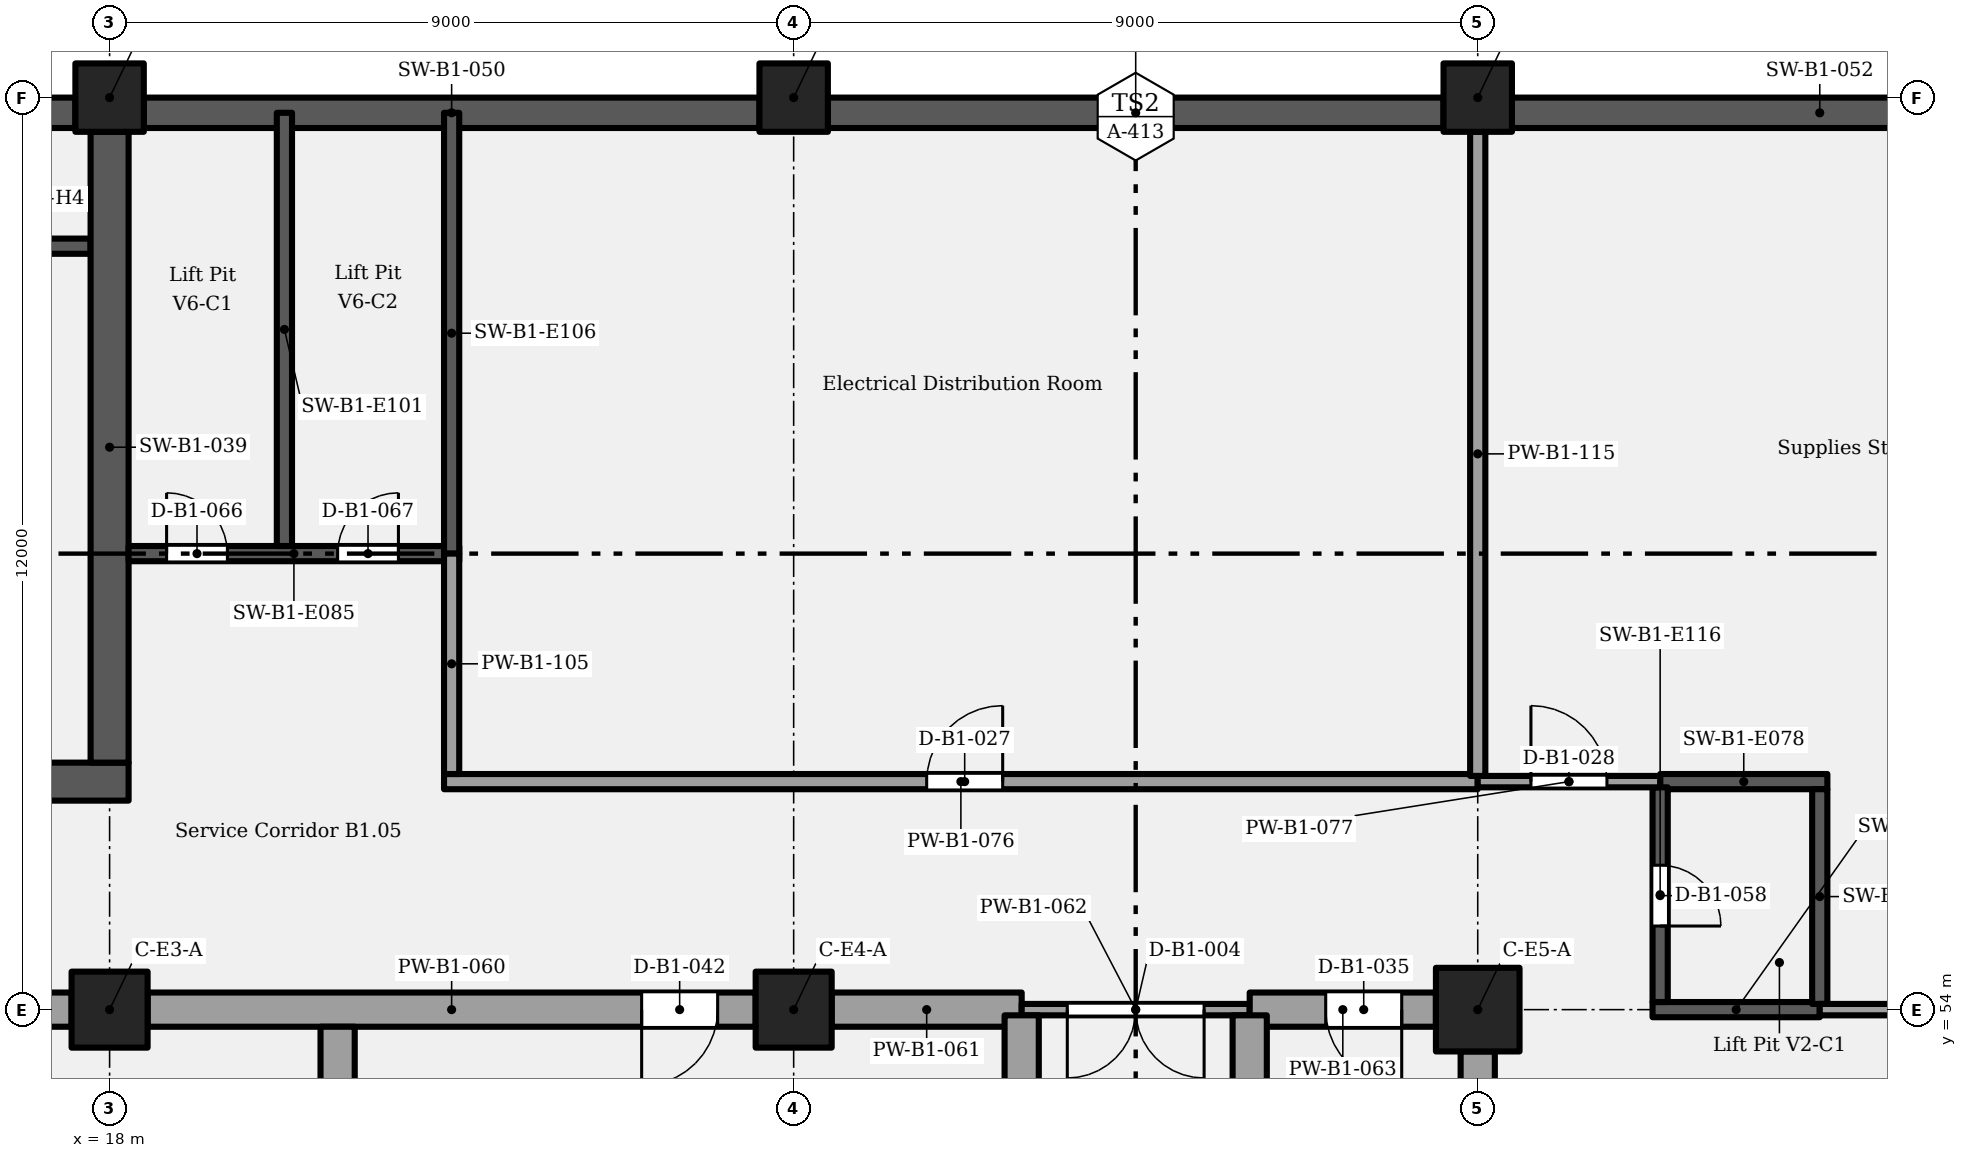
"""IFC4 building model, lengths in metres.
Left out: names, types, materials, properties, quantities, classifications, styles, units other than length and angle.
Written with IfcOpenShell. Run it as: python <this file> out.ifc"""

import sys

from ifc_helpers import new_model, si_unit, direction, frame, frame_2d, origin, origin_2d, place, context, subcontext, project, spatial, rectangle, extrude, element, fill, save


model = new_model("IFC4")
c1 = context("Model", 3, precision=1e-05, world=origin(), true_north=direction((0.0, 1.0)))
c2 = subcontext(c1, "Body", "Model", "MODEL_VIEW")
j1 = project(units=[si_unit("LENGTHUNIT", "METRE"), si_unit("PLANEANGLEUNIT", "RADIAN")], contexts=[c1])
p1 = place(None, origin())
s1 = spatial("IfcSite", under=j1, at=p1, CompositionType="ELEMENT")
p2 = place(p1, origin())
s2 = spatial("IfcBuilding", under=s1, at=p2, CompositionType="ELEMENT")
p3 = place(p2, frame((0.0, 0.0, -4.2)))
s3 = spatial("IfcBuildingStorey", under=s2, at=p3, CompositionType="ELEMENT", Elevation=-4.2)
for number, where, z_axis, x_axis in (
    (1, (18.0, 54.0, 0.0), (0.0, 0.0, 1.0), (1.0, 0.0, 0.0)),
    (2, (27.0, 54.0, 0.0), (0.0, 0.0, 1.0), (1.0, 0.0, 0.0)),
):
    element("IfcColumn", number, at=place(p3, frame(where, z_axis=z_axis, x_axis=x_axis)), inside=s3, PredefinedType="COLUMN", context=c2, shape_type="SweptSolid", body=[
        extrude(rectangle(XDim=1.0, YDim=1.0, at=origin_2d()), origin(), (0.0, 0.0, 1.0), 4.2),
    ])
p4 = place(p3, frame((36.0, 54.0, 0.0), z_axis=(0.0, 0.0, 1.0), x_axis=(1.0, 0.0, 0.0)))
e3 = element("IfcColumn", 3, at=p4, inside=s3, PredefinedType="COLUMN", context=c2, shape_type="SweptSolid", body=[
    extrude(rectangle(XDim=1.1, YDim=1.1, at=origin_2d()), origin(), (0.0, 0.0, 1.0), 4.2),
])
for number, where, z_axis, x_axis in (
    (4, (18.0, 66.0, 0.0), (0.0, 0.0, 1.0), (1.0, 0.0, 0.0)),
    (5, (27.0, 66.0, 0.0), (0.0, 0.0, 1.0), (1.0, 0.0, 0.0)),
    (6, (36.0, 66.0, 0.0), (0.0, 0.0, 1.0), (1.0, 0.0, 0.0)),
):
    element("IfcColumn", number, at=place(p3, frame(where, z_axis=z_axis, x_axis=x_axis)), inside=s3, PredefinedType="COLUMN", context=c2, shape_type="SweptSolid", body=[
        extrude(rectangle(XDim=0.9, YDim=0.9, at=origin_2d()), origin(), (0.0, 0.0, 1.0), 4.2),
    ])
p5 = place(p3, frame((8.75, 57.0, 0.0), z_axis=(0.0, 0.0, 1.0), x_axis=(1.0, 0.0, 0.0)))
e7 = element("IfcWall", 7, at=p5, inside=s3, PredefinedType="SHEAR", context=c2, shape_type="SweptSolid", body=[
    extrude(rectangle(XDim=9.5, YDim=0.5, at=frame_2d((4.75, 0.0))), origin(), (0.0, 0.0, 1.0), 3.9),
])
p6 = place(p5, frame((4.15, 0.0, 0.0)))
e8 = element("IfcOpeningElement", 8, at=p6, cuts=e7, PredefinedType="OPENING", context=c2, shape_type="SweptSolid", body=[
    extrude(rectangle(XDim=1.2, YDim=2.1, at=frame_2d((0.6, 1.05))), frame((0.0, 0.26, 0.0), z_axis=(0.0, -1.0, 0.0), x_axis=(1.0, 0.0, 0.0)), (0.0, 0.0, 1.0), 0.52),
])
p7 = place(p3, frame((18.0, 57.25, 0.0), z_axis=(0.0, 0.0, 1.0), x_axis=(0.0, 1.0, 0.0)))
e9 = element("IfcWall", 9, at=p7, inside=s3, PredefinedType="SHEAR", context=c2, shape_type="SweptSolid", body=[
    extrude(rectangle(XDim=8.3, YDim=0.5, at=frame_2d((4.15, 0.0))), origin(), (0.0, 0.0, 1.0), 3.9),
])
for number, where, z_axis, x_axis in (
    (10, (9.45, 65.8, 0.0), (0.0, 0.0, 1.0), (1.0, 0.0, 0.0)),
    (11, (18.45, 65.8, 0.0), (0.0, 0.0, 1.0), (1.0, 0.0, 0.0)),
    (12, (27.45, 65.8, 0.0), (0.0, 0.0, 1.0), (1.0, 0.0, 0.0)),
    (13, (36.45, 65.8, 0.0), (0.0, 0.0, 1.0), (1.0, 0.0, 0.0)),
):
    element("IfcWall", number, at=place(p3, frame(where, z_axis=z_axis, x_axis=x_axis)), inside=s3, PredefinedType="SOLIDWALL", context=c2, shape_type="SweptSolid", body=[
        extrude(rectangle(XDim=8.1, YDim=0.4, at=frame_2d((4.05, 0.0))), origin(), (0.0, 0.0, 1.0), 3.9),
    ])
p8 = place(p3, frame((9.5, 54.0, 0.0), z_axis=(0.0, 0.0, 1.0), x_axis=(1.0, 0.0, 0.0)))
e14 = element("IfcWall", 14, at=p8, inside=s3, PredefinedType="PARTITIONING", context=c2, shape_type="SweptSolid", body=[
    extrude(rectangle(XDim=8.0, YDim=0.45, at=frame_2d((4.0, 0.0))), origin(), (0.0, 0.0, 1.0), 3.15),
])
p9 = place(p8, frame((7.5, 0.0, 0.0), z_axis=(0.0, 0.0, 1.0), x_axis=(-1.0, 0.0, 0.0)))
e15 = element("IfcOpeningElement", 15, at=p9, cuts=e14, PredefinedType="OPENING", context=c2, shape_type="SweptSolid", body=[
    extrude(rectangle(XDim=1.0, YDim=2.1, at=frame_2d((0.5, 1.05))), frame((0.0, 0.235, 0.0), z_axis=(0.0, -1.0, 0.0), x_axis=(1.0, 0.0, 0.0)), (0.0, 0.0, 1.0), 0.47),
])
p10 = place(p3, frame((18.5, 54.0, 0.0), z_axis=(0.0, 0.0, 1.0), x_axis=(1.0, 0.0, 0.0)))
e16 = element("IfcWall", 16, at=p10, inside=s3, PredefinedType="PARTITIONING", context=c2, shape_type="SweptSolid", body=[
    extrude(rectangle(XDim=8.0, YDim=0.45, at=frame_2d((4.0, 0.0))), origin(), (0.0, 0.0, 1.0), 3.15),
])
p11 = place(p10, frame((7.5, 0.0, 0.0), z_axis=(0.0, 0.0, 1.0), x_axis=(-1.0, 0.0, 0.0)))
e17 = element("IfcOpeningElement", 17, at=p11, cuts=e16, PredefinedType="OPENING", context=c2, shape_type="SweptSolid", body=[
    extrude(rectangle(XDim=1.0, YDim=2.1, at=frame_2d((0.5, 1.05))), frame((0.0, 0.235, 0.0), z_axis=(0.0, -1.0, 0.0), x_axis=(1.0, 0.0, 0.0)), (0.0, 0.0, 1.0), 0.47),
])
p12 = place(p3, frame((27.5, 54.0, 0.0), z_axis=(0.0, 0.0, 1.0), x_axis=(1.0, 0.0, 0.0)))
e18 = element("IfcWall", 18, at=p12, inside=s3, PredefinedType="PARTITIONING", context=c2, shape_type="SweptSolid", body=[
    extrude(rectangle(XDim=2.5, YDim=0.45, at=frame_2d((1.25, 0.0))), origin(), (0.0, 0.0, 1.0), 3.15),
])
p13 = place(p3, frame((30.0, 54.0, 0.0), z_axis=(0.0, 0.0, 1.0), x_axis=(1.0, 0.0, 0.0)))
e19 = element("IfcWall", 19, at=p13, inside=s3, PredefinedType="PARTITIONING", context=c2, shape_type="SweptSolid", body=[
    extrude(rectangle(XDim=3.0, YDim=0.15, at=frame_2d((1.5, 0.0))), origin(), (0.0, 0.0, 1.0), 3.15),
])
p14 = place(p13, frame((2.4, 0.0, 0.0), z_axis=(0.0, 0.0, 1.0), x_axis=(-1.0, 0.0, 0.0)))
e20 = element("IfcOpeningElement", 20, at=p14, cuts=e19, PredefinedType="OPENING", context=c2, shape_type="SweptSolid", body=[
    extrude(rectangle(XDim=1.8, YDim=2.1, at=frame_2d((0.9, 1.05))), frame((0.0, 0.085, 0.0), z_axis=(0.0, -1.0, 0.0), x_axis=(1.0, 0.0, 0.0)), (0.0, 0.0, 1.0), 0.17),
])
p15 = place(p3, frame((33.0, 54.0, 0.0), z_axis=(0.0, 0.0, 1.0), x_axis=(1.0, 0.0, 0.0)))
e21 = element("IfcWall", 21, at=p15, inside=s3, PredefinedType="PARTITIONING", context=c2, shape_type="SweptSolid", body=[
    extrude(rectangle(XDim=2.45, YDim=0.45, at=frame_2d((1.225, 0.0))), origin(), (0.0, 0.0, 1.0), 3.15),
])
p16 = place(p15, frame((2.0, 0.0, 0.0), z_axis=(0.0, 0.0, 1.0), x_axis=(-1.0, 0.0, 0.0)))
e22 = element("IfcOpeningElement", 22, at=p16, cuts=e21, PredefinedType="OPENING", context=c2, shape_type="SweptSolid", body=[
    extrude(rectangle(XDim=1.0, YDim=2.1, at=frame_2d((0.5, 1.05))), frame((0.0, 0.235, 0.0), z_axis=(0.0, -1.0, 0.0), x_axis=(1.0, 0.0, 0.0)), (0.0, 0.0, 1.0), 0.47),
])
p17 = place(p3, frame((38.3, 54.0, 0.0), z_axis=(0.0, 0.0, 1.0), x_axis=(1.0, 0.0, 0.0)))
e23 = element("IfcWall", 23, at=p17, inside=s3, PredefinedType="SHEAR", context=c2, shape_type="SweptSolid", body=[
    extrude(rectangle(XDim=2.2, YDim=0.2, at=frame_2d((1.1, 0.0))), origin(), (0.0, 0.0, 1.0), 3.9),
])
p18 = place(p3, frame((40.5, 54.0, 0.0), z_axis=(0.0, 0.0, 1.0), x_axis=(1.0, 0.0, 0.0)))
e24 = element("IfcWall", 24, at=p18, inside=s3, PredefinedType="PARTITIONING", context=c2, shape_type="SweptSolid", body=[
    extrude(rectangle(XDim=3.95, YDim=0.15, at=frame_2d((1.975, 0.0))), origin(), (0.0, 0.0, 1.0), 3.15),
])
p19 = place(p3, frame((22.4, 57.0, 0.0), z_axis=(0.0, 0.0, 1.0), x_axis=(1.0, 0.0, 0.0)))
e25 = element("IfcWall", 25, at=p19, inside=s3, PredefinedType="PARTITIONING", context=c2, shape_type="SweptSolid", body=[
    extrude(rectangle(XDim=13.6, YDim=0.2, at=frame_2d((6.8, 0.0))), origin(), (0.0, 0.0, 1.0), 3.9),
])
p20 = place(p19, frame((6.35, 0.0, 0.0)))
e26 = element("IfcOpeningElement", 26, at=p20, cuts=e25, PredefinedType="OPENING", context=c2, shape_type="SweptSolid", body=[
    extrude(rectangle(XDim=1.0, YDim=2.1, at=frame_2d((0.5, 1.05))), frame((0.0, 0.11, 0.0), z_axis=(0.0, -1.0, 0.0), x_axis=(1.0, 0.0, 0.0)), (0.0, 0.0, 1.0), 0.22),
])
p21 = place(p3, frame((36.0, 57.0, 0.0), z_axis=(0.0, 0.0, 1.0), x_axis=(1.0, 0.0, 0.0)))
e27 = element("IfcWall", 27, at=p21, inside=s3, PredefinedType="PARTITIONING", context=c2, shape_type="SweptSolid", body=[
    extrude(rectangle(XDim=2.4, YDim=0.15, at=frame_2d((1.2, 0.0))), origin(), (0.0, 0.0, 1.0), 3.4),
])
p22 = place(p21, frame((0.7, 0.0, 0.0)))
e28 = element("IfcOpeningElement", 28, at=p22, cuts=e27, PredefinedType="OPENING", context=c2, shape_type="SweptSolid", body=[
    extrude(rectangle(XDim=1.0, YDim=2.1, at=frame_2d((0.5, 1.05))), frame((0.0, 0.085, 0.0), z_axis=(0.0, -1.0, 0.0), x_axis=(1.0, 0.0, 0.0)), (0.0, 0.0, 1.0), 0.17),
])
p23 = place(p3, frame((38.4, 57.0, 0.0), z_axis=(0.0, 0.0, 1.0), x_axis=(1.0, 0.0, 0.0)))
e29 = element("IfcWall", 29, at=p23, inside=s3, PredefinedType="SHEAR", context=c2, shape_type="SweptSolid", body=[
    extrude(rectangle(XDim=2.2, YDim=0.2, at=frame_2d((1.1, 0.0))), origin(), (0.0, 0.0, 1.0), 3.9),
])
p24 = place(p3, frame((18.25, 60.0, 0.0), z_axis=(0.0, 0.0, 1.0), x_axis=(1.0, 0.0, 0.0)))
e30 = element("IfcWall", 30, at=p24, inside=s3, PredefinedType="SHEAR", context=c2, shape_type="SweptSolid", body=[
    extrude(rectangle(XDim=4.35, YDim=0.2, at=frame_2d((2.175, 0.0))), origin(), (0.0, 0.0, 1.0), 3.9),
])
p25 = place(p24, frame((0.5, 0.0, 0.0)))
e31 = element("IfcOpeningElement", 31, at=p25, cuts=e30, PredefinedType="OPENING", context=c2, shape_type="SweptSolid", body=[
    extrude(rectangle(XDim=0.8, YDim=2.0, at=frame_2d((0.4, 1.0))), frame((0.0, 0.11, 0.0), z_axis=(0.0, -1.0, 0.0), x_axis=(1.0, 0.0, 0.0)), (0.0, 0.0, 1.0), 0.22),
])
p26 = place(p24, frame((2.75, 0.0, 0.0)))
e32 = element("IfcOpeningElement", 32, at=p26, cuts=e30, PredefinedType="OPENING", context=c2, shape_type="SweptSolid", body=[
    extrude(rectangle(XDim=0.8, YDim=2.0, at=frame_2d((0.4, 1.0))), frame((0.0, 0.11, 0.0), z_axis=(0.0, -1.0, 0.0), x_axis=(1.0, 0.0, 0.0)), (0.0, 0.0, 1.0), 0.22),
])
p27 = place(p3, frame((20.3, 60.1, 0.0), z_axis=(0.0, 0.0, 1.0), x_axis=(0.0, 1.0, 0.0)))
e33 = element("IfcWall", 33, at=p27, inside=s3, PredefinedType="SHEAR", context=c2, shape_type="SweptSolid", body=[
    extrude(rectangle(XDim=5.7, YDim=0.2, at=frame_2d((2.85, 0.0))), origin(), (0.0, 0.0, 1.0), 3.9),
])
p28 = place(p3, frame((21.0, 37.5, 0.0), z_axis=(0.0, 0.0, 1.0), x_axis=(0.0, 1.0, 0.0)))
e34 = element("IfcWall", 34, at=p28, inside=s3, PredefinedType="PARTITIONING", context=c2, shape_type="SweptSolid", body=[
    extrude(rectangle(XDim=16.275, YDim=0.45, at=frame_2d((8.137, 0.0))), origin(), (0.0, 0.0, 1.0), 3.9),
])
p29 = place(p3, frame((22.5, 57.1, 0.0), z_axis=(0.0, 0.0, 1.0), x_axis=(0.0, 1.0, 0.0)))
e35 = element("IfcWall", 35, at=p29, inside=s3, PredefinedType="PARTITIONING", context=c2, shape_type="SweptSolid", body=[
    extrude(rectangle(XDim=2.9, YDim=0.2, at=frame_2d((1.45, 0.0))), origin(), (0.0, 0.0, 1.0), 3.15),
])
p30 = place(p3, frame((22.5, 60.0, 0.0), z_axis=(0.0, 0.0, 1.0), x_axis=(0.0, 1.0, 0.0)))
e36 = element("IfcWall", 36, at=p30, inside=s3, PredefinedType="SHEAR", context=c2, shape_type="SweptSolid", body=[
    extrude(rectangle(XDim=5.8, YDim=0.2, at=frame_2d((2.9, 0.0))), origin(), (0.0, 0.0, 1.0), 3.9),
])
p31 = place(p3, frame((30.0, 37.5, 0.0), z_axis=(0.0, 0.0, 1.0), x_axis=(0.0, 1.0, 0.0)))
e37 = element("IfcWall", 37, at=p31, inside=s3, PredefinedType="PARTITIONING", context=c2, shape_type="SweptSolid", body=[
    extrude(rectangle(XDim=16.425, YDim=0.45, at=frame_2d((8.212, 0.0))), origin(), (0.0, 0.0, 1.0), 3.9),
])
p32 = place(p31, frame((3.65, 0.0, 0.0)))
e38 = element("IfcOpeningElement", 38, at=p32, cuts=e37, PredefinedType="OPENING", context=c2, shape_type="SweptSolid", body=[
    extrude(rectangle(XDim=1.0, YDim=2.1, at=frame_2d((0.5, 1.05))), frame((0.0, 0.235, 0.0), z_axis=(0.0, -1.0, 0.0), x_axis=(1.0, 0.0, 0.0)), (0.0, 0.0, 1.0), 0.47),
])
p33 = place(p3, frame((33.0, 37.5, 0.0), z_axis=(0.0, 0.0, 1.0), x_axis=(0.0, 1.0, 0.0)))
e39 = element("IfcWall", 39, at=p33, inside=s3, PredefinedType="PARTITIONING", context=c2, shape_type="SweptSolid", body=[
    extrude(rectangle(XDim=16.425, YDim=0.45, at=frame_2d((8.212, 0.0))), origin(), (0.0, 0.0, 1.0), 3.9),
])
p34 = place(p33, frame((4.65, 0.0, 0.0), z_axis=(0.0, 0.0, 1.0), x_axis=(-1.0, 0.0, 0.0)))
e40 = element("IfcOpeningElement", 40, at=p34, cuts=e39, PredefinedType="OPENING", context=c2, shape_type="SweptSolid", body=[
    extrude(rectangle(XDim=1.0, YDim=2.1, at=frame_2d((0.5, 1.05))), frame((0.0, 0.235, 0.0), z_axis=(0.0, -1.0, 0.0), x_axis=(1.0, 0.0, 0.0)), (0.0, 0.0, 1.0), 0.47),
])
p35 = place(p3, frame((36.0, 51.225, 0.0), z_axis=(0.0, 0.0, 1.0), x_axis=(0.0, 1.0, 0.0)))
e41 = element("IfcWall", 41, at=p35, inside=s3, PredefinedType="PARTITIONING", context=c2, shape_type="SweptSolid", body=[
    extrude(rectangle(XDim=2.225, YDim=0.45, at=frame_2d((1.112, 0.0))), origin(), (0.0, 0.0, 1.0), 2.95),
])
p36 = place(p3, frame((36.0, 57.075, 0.0), z_axis=(0.0, 0.0, 1.0), x_axis=(0.0, 1.0, 0.0)))
e42 = element("IfcWall", 42, at=p36, inside=s3, PredefinedType="PARTITIONING", context=c2, shape_type="SweptSolid", body=[
    extrude(rectangle(XDim=8.475, YDim=0.2, at=frame_2d((4.238, 0.0))), origin(), (0.0, 0.0, 1.0), 3.15),
])
p37 = place(p3, frame((38.4, 54.1, 0.0), z_axis=(0.0, 0.0, 1.0), x_axis=(0.0, 1.0, 0.0)))
e43 = element("IfcWall", 43, at=p37, inside=s3, PredefinedType="SHEAR", context=c2, shape_type="SweptSolid", body=[
    extrude(rectangle(XDim=2.825, YDim=0.2, at=frame_2d((1.413, 0.0))), origin(), (0.0, 0.0, 1.0), 3.9),
])
p38 = place(p37, frame((1.8, 0.0, 0.0), z_axis=(0.0, 0.0, 1.0), x_axis=(-1.0, 0.0, 0.0)))
e44 = element("IfcOpeningElement", 44, at=p38, cuts=e43, PredefinedType="OPENING", context=c2, shape_type="SweptSolid", body=[
    extrude(rectangle(XDim=0.8, YDim=2.0, at=frame_2d((0.4, 1.0))), frame((0.0, 0.11, 0.0), z_axis=(0.0, -1.0, 0.0), x_axis=(1.0, 0.0, 0.0)), (0.0, 0.0, 1.0), 0.22),
])
p39 = place(p3, frame((40.5, 54.075, 0.0), z_axis=(0.0, 0.0, 1.0), x_axis=(0.0, 1.0, 0.0)))
e45 = element("IfcWall", 45, at=p39, inside=s3, PredefinedType="SHEAR", context=c2, shape_type="SweptSolid", body=[
    extrude(rectangle(XDim=2.825, YDim=0.2, at=frame_2d((1.413, 0.0))), origin(), (0.0, 0.0, 1.0), 3.9),
])
p40 = place(p3, frame((9.25, 64.045, 0.0), z_axis=(0.0, 0.0, 1.0), x_axis=(1.0, 0.0, 0.0)))
e46 = element("IfcWall", 46, at=p40, inside=s3, PredefinedType="SHEAR", context=c2, shape_type="SweptSolid", body=[
    extrude(rectangle(XDim=8.5, YDim=0.2, at=frame_2d((4.25, 0.0))), origin(), (0.0, 0.0, 1.0), 3.9),
])
p41 = place(p14, origin())
e47 = element("IfcDoor", 47, at=p41, inside=s3, OperationType="DOUBLE_DOOR_SINGLE_SWING", PredefinedType="DOOR", context=c2, shape_type="SweptSolid", body=[
    extrude(rectangle(XDim=1.8, YDim=2.1, at=frame_2d((0.9, 1.05))), frame((0.0, 0.025, 0.0), z_axis=(0.0, -1.0, 0.0), x_axis=(1.0, 0.0, 0.0)), (0.0, 0.0, 1.0), 0.05),
])
fill(e20, e47)
p42 = place(p20, origin())
e48 = element("IfcDoor", 48, at=p42, inside=s3, OperationType="SINGLE_SWING_RIGHT", PredefinedType="DOOR", context=c2, shape_type="SweptSolid", body=[
    extrude(rectangle(XDim=1.0, YDim=2.1, at=frame_2d((0.5, 1.05))), frame((0.0, 0.025, 0.0), z_axis=(0.0, -1.0, 0.0), x_axis=(1.0, 0.0, 0.0)), (0.0, 0.0, 1.0), 0.05),
])
fill(e26, e48)
p43 = place(p22, origin())
e49 = element("IfcDoor", 49, at=p43, inside=s3, OperationType="SINGLE_SWING_LEFT", PredefinedType="DOOR", context=c2, shape_type="SweptSolid", body=[
    extrude(rectangle(XDim=1.0, YDim=2.1, at=frame_2d((0.5, 1.05))), frame((0.0, 0.025, 0.0), z_axis=(0.0, -1.0, 0.0), x_axis=(1.0, 0.0, 0.0)), (0.0, 0.0, 1.0), 0.05),
])
fill(e28, e49)
p44 = place(p16, origin())
e50 = element("IfcDoor", 50, at=p44, inside=s3, OperationType="SINGLE_SWING_LEFT", PredefinedType="DOOR", context=c2, shape_type="SweptSolid", body=[
    extrude(rectangle(XDim=1.0, YDim=2.1, at=frame_2d((0.5, 1.05))), frame((0.0, 0.025, 0.0), z_axis=(0.0, -1.0, 0.0), x_axis=(1.0, 0.0, 0.0)), (0.0, 0.0, 1.0), 0.05),
])
fill(e22, e50)
p45 = place(p11, origin())
e51 = element("IfcDoor", 51, at=p45, inside=s3, OperationType="SINGLE_SWING_RIGHT", PredefinedType="DOOR", context=c2, shape_type="SweptSolid", body=[
    extrude(rectangle(XDim=1.0, YDim=2.1, at=frame_2d((0.5, 1.05))), frame((0.0, 0.025, 0.0), z_axis=(0.0, -1.0, 0.0), x_axis=(1.0, 0.0, 0.0)), (0.0, 0.0, 1.0), 0.05),
])
fill(e17, e51)
p46 = place(p38, origin())
e52 = element("IfcDoor", 52, at=p46, inside=s3, OperationType="SINGLE_SWING_RIGHT", PredefinedType="DOOR", context=c2, shape_type="SweptSolid", body=[
    extrude(rectangle(XDim=0.8, YDim=2.0, at=frame_2d((0.4, 1.0))), frame((0.0, 0.025, 0.0), z_axis=(0.0, -1.0, 0.0), x_axis=(1.0, 0.0, 0.0)), (0.0, 0.0, 1.0), 0.05),
])
fill(e44, e52)
p47 = place(p25, origin())
e53 = element("IfcDoor", 53, at=p47, inside=s3, OperationType="SINGLE_SWING_LEFT", PredefinedType="DOOR", context=c2, shape_type="SweptSolid", body=[
    extrude(rectangle(XDim=0.8, YDim=2.0, at=frame_2d((0.4, 1.0))), frame((0.0, 0.025, 0.0), z_axis=(0.0, -1.0, 0.0), x_axis=(1.0, 0.0, 0.0)), (0.0, 0.0, 1.0), 0.05),
])
fill(e31, e53)
p48 = place(p26, origin())
e54 = element("IfcDoor", 54, at=p48, inside=s3, OperationType="SINGLE_SWING_RIGHT", PredefinedType="DOOR", context=c2, shape_type="SweptSolid", body=[
    extrude(rectangle(XDim=0.8, YDim=2.0, at=frame_2d((0.4, 1.0))), frame((0.0, 0.025, 0.0), z_axis=(0.0, -1.0, 0.0), x_axis=(1.0, 0.0, 0.0)), (0.0, 0.0, 1.0), 0.05),
])
fill(e32, e54)
save(model, sys.argv[1])
